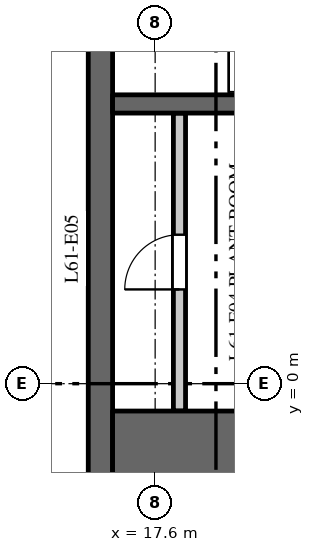
"""IFC4 building model, lengths in metres.
Left out: names, types, materials, properties, quantities, classifications, styles, units other than length and angle.
Written with IfcOpenShell. Run it as: python <this file> out.ifc"""

import sys

from ifc_helpers import new_model, si_unit, direction, frame, frame_2d, origin, place, context, subcontext, project, spatial, rectangle, extrude, element, fill, save


model = new_model("IFC4")
c1 = context("Model", 3, precision=1e-05, world=origin(), true_north=direction((0.0, 1.0)))
c2 = subcontext(c1, "Body", "Model", "MODEL_VIEW")
j1 = project(units=[si_unit("LENGTHUNIT", "METRE"), si_unit("PLANEANGLEUNIT", "RADIAN")], contexts=[c1])
p1 = place(None, origin())
s1 = spatial("IfcSite", under=j1, at=p1, CompositionType="ELEMENT")
p2 = place(p1, origin())
s2 = spatial("IfcBuilding", under=s1, at=p2, CompositionType="ELEMENT")
p3 = place(p2, frame((0.0, 0.0, 285.5)))
s3 = spatial("IfcBuildingStorey", under=s2, at=p3, CompositionType="ELEMENT", Elevation=285.5)
p4 = place(p3, frame((18.0, -0.45, 0.0), z_axis=(0.0, 0.0, 1.0), x_axis=(0.0, 1.0, 0.0)))
e1 = element("IfcWall", 1, at=p4, inside=s3, PredefinedType="PARTITIONING", context=c2, shape_type="SweptSolid", body=[
    extrude(rectangle(XDim=4.9, YDim=0.2, at=frame_2d((2.45, 0.0))), origin(), (0.0, 0.0, 1.0), 5.2),
])
p5 = place(p4, frame((2.0, 0.0, 0.0)))
e2 = element("IfcOpeningElement", 2, at=p5, cuts=e1, PredefinedType="OPENING", context=c2, shape_type="SweptSolid", body=[
    extrude(rectangle(XDim=0.9, YDim=2.1, at=frame_2d((0.45, 1.05))), frame((0.0, 0.11, 0.0), z_axis=(0.0, -1.0, 0.0), x_axis=(1.0, 0.0, 0.0)), (0.0, 0.0, 1.0), 0.22),
])
p6 = place(p3, frame((16.7, -8.0, 0.0), z_axis=(0.0, 0.0, 1.0), x_axis=(0.0, 1.0, 0.0)))
e3 = element("IfcWall", 3, at=p6, inside=s3, PredefinedType="SHEAR", context=c2, shape_type="SweptSolid", body=[
    extrude(rectangle(XDim=16.0, YDim=0.4, at=frame_2d((8.0, 0.0))), origin(), (0.0, 0.0, 1.0), 5.2),
])
p7 = place(p3, frame((16.9, -1.075, 0.0), z_axis=(0.0, 0.0, 1.0), x_axis=(1.0, 0.0, 0.0)))
e4 = element("IfcWall", 4, at=p7, inside=s3, PredefinedType="SHEAR", context=c2, shape_type="SweptSolid", body=[
    extrude(rectangle(XDim=2.9, YDim=1.25, at=frame_2d((1.45, 0.0))), origin(), (0.0, 0.0, 1.0), 5.2),
])
p8 = place(p3, frame((16.9, 4.6, 0.0), z_axis=(0.0, 0.0, 1.0), x_axis=(1.0, 0.0, 0.0)))
e5 = element("IfcWall", 5, at=p8, inside=s3, PredefinedType="SHEAR", context=c2, shape_type="SweptSolid", body=[
    extrude(rectangle(XDim=6.18, YDim=0.3, at=frame_2d((3.09, 0.0))), origin(), (0.0, 0.0, 1.0), 5.2),
])
p9 = place(p8, frame((4.9, 0.0, 0.0)))
e6 = element("IfcOpeningElement", 6, at=p9, cuts=e5, PredefinedType="OPENING", context=c2, shape_type="SweptSolid", body=[
    extrude(rectangle(XDim=1.1, YDim=2.1, at=frame_2d((0.55, 1.05))), frame((0.0, 0.16, 0.0), z_axis=(0.0, -1.0, 0.0), x_axis=(1.0, 0.0, 0.0)), (0.0, 0.0, 1.0), 0.32),
])
p10 = place(p5, origin())
e7 = element("IfcDoor", 7, at=p10, inside=s3, OperationType="SINGLE_SWING_RIGHT", PredefinedType="DOOR", context=c2, shape_type="SweptSolid", body=[
    extrude(rectangle(XDim=0.9, YDim=2.1, at=frame_2d((0.45, 1.05))), frame((0.0, 0.025, 0.0), z_axis=(0.0, -1.0, 0.0), x_axis=(1.0, 0.0, 0.0)), (0.0, 0.0, 1.0), 0.05),
])
fill(e2, e7)
save(model, sys.argv[1])
